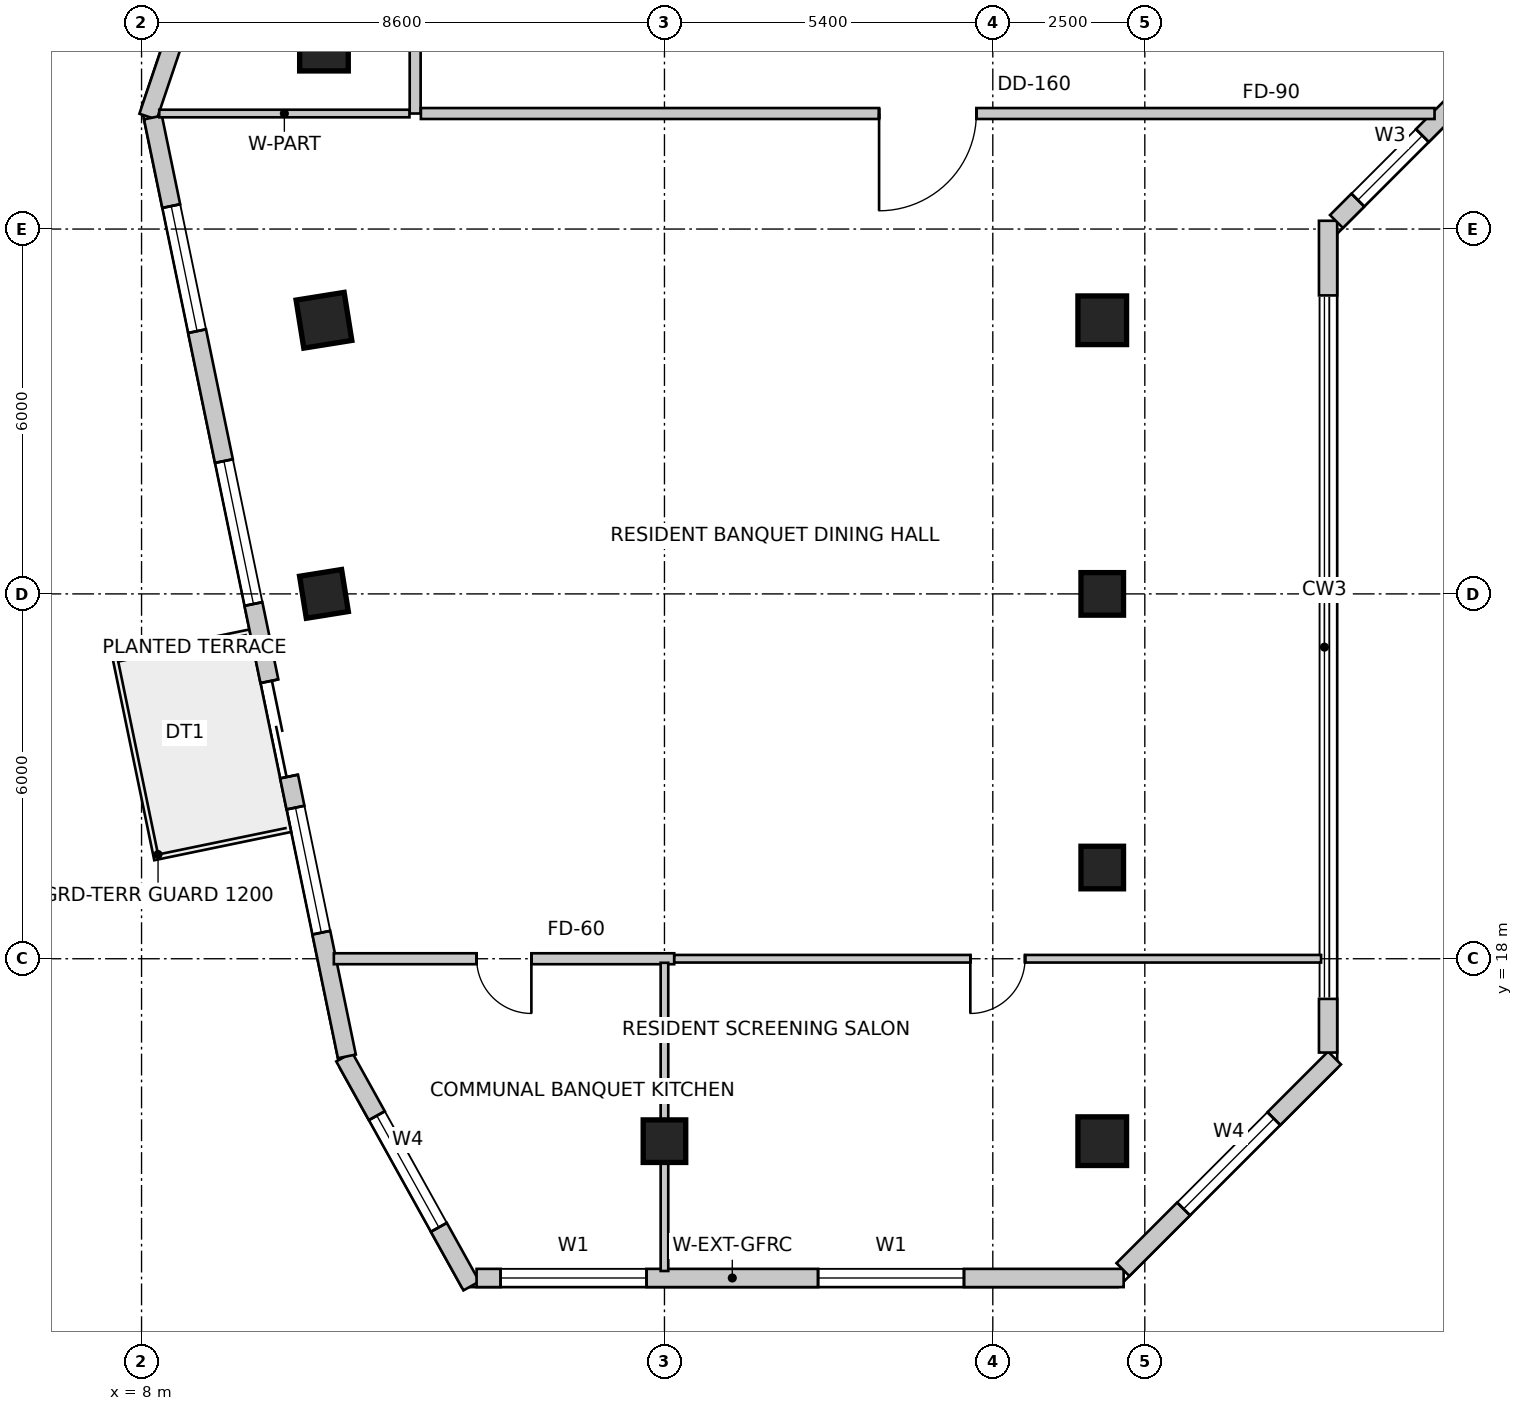
"""IFC4 building model, lengths in metres.
Left out: names, types, materials, properties, quantities, classifications, styles, units other than length and angle.
Written with IfcOpenShell. Run it as: python <this file> out.ifc"""

import sys

from ifc_helpers import new_model, si_unit, direction, frame, frame_2d, origin, origin_2d, place, context, subcontext, project, spatial, rectangle, extrude, source, transform, mapped, element, fill, save


model = new_model("IFC4")
c1 = context("Model", 3, precision=1e-05, world=origin(), true_north=direction((0.0, 1.0)))
c2 = subcontext(c1, "Body", "Model", "MODEL_VIEW")
j1 = project(units=[si_unit("LENGTHUNIT", "METRE"), si_unit("PLANEANGLEUNIT", "RADIAN")], contexts=[c1])
p1 = place(None, origin())
s1 = spatial("IfcSite", under=j1, at=p1, CompositionType="ELEMENT")
p2 = place(p1, origin())
s2 = spatial("IfcBuilding", under=s1, at=p2, CompositionType="ELEMENT")
p3 = place(p2, frame((0.0, 0.0, 207.9)))
s3 = spatial("IfcBuildingStorey", under=s2, at=p3, CompositionType="ELEMENT", Elevation=207.9)
m1 = source(origin(), c2, "Body", "SweptSolid", [
    extrude(rectangle(XDim=0.8, YDim=0.8, at=origin_2d()), origin(), (0.0, 0.0, 1.0), 3.5),
])
for number, where, z_axis, x_axis in (
    (1, (11.0, 33.0, 0.0), (0.0, 0.0, 1.0), (1.0, 0.0, 0.0)),
    (2, (11.0, 28.5, 0.0), (0.0, 0.0, 1.0), (0.158, -0.987, 0.0)),
):
    element("IfcColumn", number, at=place(p3, frame(where, z_axis=z_axis, x_axis=x_axis)), inside=s3, PredefinedType="COLUMN", context=c2, shape_type="MappedRepresentation", body=[
        mapped(m1, transform((0.0, 0.0, 0.0), scale=1.0)),
    ])
m2 = source(origin(), c2, "Body", "SweptSolid", [
    extrude(rectangle(XDim=0.7, YDim=0.7, at=origin_2d()), origin(), (0.0, 0.0, 1.0), 3.5),
])
p4 = place(p3, frame((11.0, 24.0, 0.0), z_axis=(0.0, 0.0, 1.0), x_axis=(0.158158067254, -0.987413806751, 0.0)))
e3 = element("IfcColumn", 3, at=p4, inside=s3, PredefinedType="COLUMN", context=c2, shape_type="MappedRepresentation", body=[
    mapped(m2, transform((0.0, 0.0, 0.0), scale=1.0)),
])
p5 = place(p3, frame((23.8, 28.5, 0.0), z_axis=(0.0, 0.0, 1.0), x_axis=(1.0, 0.0, 0.0)))
e4 = element("IfcColumn", 4, at=p5, inside=s3, PredefinedType="COLUMN", context=c2, shape_type="MappedRepresentation", body=[
    mapped(m1, transform((0.0, 0.0, 0.0), scale=1.0)),
])
for number, where, z_axis, x_axis in (
    (5, (23.8, 24.0, 0.0), (0.0, 0.0, 1.0), (1.0, 0.0, 0.0)),
    (6, (23.8, 19.5, 0.0), (0.0, 0.0, 1.0), (1.0, 0.0, 0.0)),
):
    element("IfcColumn", number, at=place(p3, frame(where, z_axis=z_axis, x_axis=x_axis)), inside=s3, PredefinedType="COLUMN", context=c2, shape_type="MappedRepresentation", body=[
        mapped(m2, transform((0.0, 0.0, 0.0), scale=1.0)),
    ])
p6 = place(p3, frame((23.8, 15.0, 0.0), z_axis=(0.0, 0.0, 1.0), x_axis=(1.0, 0.0, 0.0)))
e7 = element("IfcColumn", 7, at=p6, inside=s3, PredefinedType="COLUMN", context=c2, shape_type="MappedRepresentation", body=[
    mapped(m1, transform((0.0, 0.0, 0.0), scale=1.0)),
])
p7 = place(p3, frame((16.6, 15.0, 0.0), z_axis=(0.0, 0.0, 1.0), x_axis=(1.0, 0.0, 0.0)))
e8 = element("IfcColumn", 8, at=p7, inside=s3, PredefinedType="COLUMN", context=c2, shape_type="MappedRepresentation", body=[
    mapped(m2, transform((0.0, 0.0, 0.0), scale=1.0)),
])
p8 = place(p3, frame((11.333, 16.384, 0.0), z_axis=(0.0, 0.0, 1.0), x_axis=(0.485633305139, -0.874162623852, 0.0)))
e9 = element("IfcWall", 9, at=p8, inside=s3, PredefinedType="SOLIDWALL", context=c2, shape_type="SweptSolid", body=[
    extrude(rectangle(XDim=4.307, YDim=0.3, at=frame_2d((2.153, 0.0))), origin(), (0.0, 0.0, 1.0), 3.2),
])
m3 = source(origin(), c2, "Body", "SweptSolid", [
    extrude(rectangle(XDim=2.1, YDim=2.0, at=frame_2d((1.05, 1.0))), frame((0.0, 0.16, 0.0), z_axis=(0.0, -1.0, 0.0), x_axis=(1.0, 0.0, 0.0)), (0.0, 0.0, 1.0), 0.32),
])
p9 = place(p8, frame((1.104, 0.0, 0.85)))
e10 = element("IfcOpeningElement", 10, at=p9, cuts=e9, PredefinedType="OPENING", context=c2, shape_type="MappedRepresentation", body=[
    mapped(m3, transform((0.0, 0.0, 0.0), scale=1.0)),
])
p10 = place(p3, frame((13.51, 12.75, 0.0), z_axis=(0.0, 0.0, 1.0), x_axis=(1.0, 0.0, 0.0)))
e11 = element("IfcWall", 11, at=p10, inside=s3, PredefinedType="SOLIDWALL", context=c2, shape_type="SweptSolid", body=[
    extrude(rectangle(XDim=10.642, YDim=0.3, at=frame_2d((5.321, 0.0))), origin(), (0.0, 0.0, 1.0), 3.2),
])
m4 = source(origin(), c2, "Body", "SweptSolid", [
    extrude(rectangle(XDim=2.4, YDim=2.2, at=frame_2d((1.2, 1.1))), frame((0.0, 0.16, 0.0), z_axis=(0.0, -1.0, 0.0), x_axis=(1.0, 0.0, 0.0)), (0.0, 0.0, 1.0), 0.32),
])
p11 = place(p10, frame((0.395, 0.0, 0.85)))
e12 = element("IfcOpeningElement", 12, at=p11, cuts=e11, PredefinedType="OPENING", context=c2, shape_type="MappedRepresentation", body=[
    mapped(m4, transform((0.0, 0.0, 0.0), scale=1.0)),
])
p12 = place(p10, frame((5.616, 0.0, 0.85)))
e13 = element("IfcOpeningElement", 13, at=p12, cuts=e11, PredefinedType="OPENING", context=c2, shape_type="MappedRepresentation", body=[
    mapped(m4, transform((0.0, 0.0, 0.0), scale=1.0)),
])
p13 = place(p3, frame((24.14, 12.888, 0.0), z_axis=(0.0, 0.0, 1.0), x_axis=(0.707106781187, 0.707106781187, 0.0)))
e14 = element("IfcWall", 14, at=p13, inside=s3, PredefinedType="SOLIDWALL", context=c2, shape_type="SweptSolid", body=[
    extrude(rectangle(XDim=4.922, YDim=0.3, at=frame_2d((2.461, 0.0))), origin(), (0.0, 0.0, 1.0), 3.2),
])
p14 = place(p13, frame((1.411, 0.0, 0.85)))
e15 = element("IfcOpeningElement", 15, at=p14, cuts=e14, PredefinedType="OPENING", context=c2, shape_type="MappedRepresentation", body=[
    mapped(m3, transform((0.0, 0.0, 0.0), scale=1.0)),
])
p15 = place(p3, frame((27.514, 16.457, 0.0), z_axis=(0.0, 0.0, 1.0), x_axis=(0.0, 1.0, 0.0)))
e16 = element("IfcWall", 16, at=p15, inside=s3, PredefinedType="SOLIDWALL", context=c2, shape_type="SweptSolid", body=[
    extrude(rectangle(XDim=0.882, YDim=0.3, at=frame_2d((0.441, 0.0))), origin(), (0.0, 0.0, 1.0), 3.2),
])
p16 = place(p3, frame((27.514, 28.909, 0.0), z_axis=(0.0, 0.0, 1.0), x_axis=(0.0, 1.0, 0.0)))
e17 = element("IfcWall", 17, at=p16, inside=s3, PredefinedType="SOLIDWALL", context=c2, shape_type="SweptSolid", body=[
    extrude(rectangle(XDim=1.227, YDim=0.3, at=frame_2d((0.614, 0.0))), origin(), (0.0, 0.0, 1.0), 3.2),
])
p17 = place(p3, frame((27.652, 30.124, 0.0), z_axis=(0.0, 0.0, 1.0), x_axis=(0.707064797706, 0.707148762175, 0.0)))
e18 = element("IfcWall", 18, at=p17, inside=s3, PredefinedType="SOLIDWALL", context=c2, shape_type="SweptSolid", body=[
    extrude(rectangle(XDim=2.908, YDim=0.3, at=frame_2d((1.454, 0.0))), origin(), (0.0, 0.0, 1.0), 3.2),
])
m5 = source(origin(), c2, "Body", "SweptSolid", [
    extrude(rectangle(XDim=1.5, YDim=1.8, at=frame_2d((0.75, 0.9))), frame((0.0, 0.16, 0.0), z_axis=(0.0, -1.0, 0.0), x_axis=(1.0, 0.0, 0.0)), (0.0, 0.0, 1.0), 0.32),
])
p18 = place(p17, frame((0.498, 0.0, 0.85)))
e19 = element("IfcOpeningElement", 19, at=p18, cuts=e18, PredefinedType="OPENING", context=c2, shape_type="MappedRepresentation", body=[
    mapped(m5, transform((0.0, 0.0, 0.0), scale=1.0)),
])
p19 = place(p3, frame((13.269, 47.134, 0.0), z_axis=(0.0, 0.0, 1.0), x_axis=(-0.319920776449, -0.947444297464, 0.0)))
e20 = element("IfcWall", 20, at=p19, inside=s3, PredefinedType="SOLIDWALL", context=c2, shape_type="SweptSolid", body=[
    extrude(rectangle(XDim=16.133, YDim=0.3, at=frame_2d((8.067, 0.0))), origin(), (0.0, 0.0, 1.0), 3.2),
])
p20 = place(p19, frame((2.363, 0.0, 0.85)))
e21 = element("IfcOpeningElement", 21, at=p20, cuts=e20, PredefinedType="OPENING", context=c2, shape_type="MappedRepresentation", body=[
    mapped(m4, transform((0.0, 0.0, 0.0), scale=1.0)),
])
p21 = place(p19, frame((7.41, 0.0, 0.85)))
e22 = element("IfcOpeningElement", 22, at=p21, cuts=e20, PredefinedType="OPENING", context=c2, shape_type="MappedRepresentation", body=[
    mapped(m3, transform((0.0, 0.0, 0.0), scale=1.0)),
])
p22 = place(p19, frame((12.157, 0.0, 0.85)))
e23 = element("IfcOpeningElement", 23, at=p22, cuts=e20, PredefinedType="OPENING", context=c2, shape_type="MappedRepresentation", body=[
    mapped(m4, transform((0.0, 0.0, 0.0), scale=1.0)),
])
p23 = place(p3, frame((8.188, 31.834, 0.0), z_axis=(0.0, 0.0, 1.0), x_axis=(0.202303475707, -0.979322880217, 0.0)))
e24 = element("IfcWall", 24, at=p23, inside=s3, PredefinedType="SOLIDWALL", context=c2, shape_type="SweptSolid", body=[
    extrude(rectangle(XDim=15.766, YDim=0.3, at=frame_2d((7.883, 0.0))), origin(), (0.0, 0.0, 1.0), 3.2),
])
m6 = source(origin(), c2, "Body", "SweptSolid", [
    extrude(rectangle(XDim=1.6, YDim=2.15, at=frame_2d((0.8, 1.075))), frame((0.0, 0.16, 0.0), z_axis=(0.0, -1.0, 0.0), x_axis=(1.0, 0.0, 0.0)), (0.0, 0.0, 1.0), 0.32),
])
p24 = place(p23, frame((9.466, 0.0, 0.0)))
e25 = element("IfcOpeningElement", 25, at=p24, cuts=e24, PredefinedType="OPENING", context=c2, shape_type="MappedRepresentation", body=[
    mapped(m6, transform((0.0, 0.0, 0.0), scale=1.0)),
])
p25 = place(p23, frame((1.487, 0.0, 0.85)))
e26 = element("IfcOpeningElement", 26, at=p25, cuts=e24, PredefinedType="OPENING", context=c2, shape_type="MappedRepresentation", body=[
    mapped(m3, transform((0.0, 0.0, 0.0), scale=1.0)),
])
p26 = place(p23, frame((5.769, 0.0, 0.85)))
e27 = element("IfcOpeningElement", 27, at=p26, cuts=e24, PredefinedType="OPENING", context=c2, shape_type="MappedRepresentation", body=[
    mapped(m4, transform((0.0, 0.0, 0.0), scale=1.0)),
])
p27 = place(p23, frame((11.588, 0.0, 0.85)))
e28 = element("IfcOpeningElement", 28, at=p27, cuts=e24, PredefinedType="OPENING", context=c2, shape_type="MappedRepresentation", body=[
    mapped(m3, transform((0.0, 0.0, 0.0), scale=1.0)),
])
p28 = place(p3, frame((12.5, 31.9, 0.0), z_axis=(0.0, 0.0, 1.0), x_axis=(0.0, 1.0, 0.0)))
e29 = element("IfcWall", 29, at=p28, inside=s3, PredefinedType="PARTITIONING", context=c2, shape_type="SweptSolid", body=[
    extrude(rectangle(XDim=1.556, YDim=0.18, at=frame_2d((0.778, 0.0))), origin(), (0.0, 0.0, 1.0), 2.869),
])
p29 = place(p3, frame((29.265, 31.9, 0.0), z_axis=(0.0, 0.0, 1.0), x_axis=(-1.0, 0.0, 0.0)))
e30 = element("IfcWall", 30, at=p29, inside=s3, PredefinedType="PARTITIONING", context=c2, shape_type="SweptSolid", body=[
    extrude(rectangle(XDim=16.671, YDim=0.18, at=frame_2d((8.335, 0.0))), origin(), (0.0, 0.0, 1.0), 2.869),
])
m7 = source(origin(), c2, "Body", "SweptSolid", [
    extrude(rectangle(XDim=1.6, YDim=2.15, at=frame_2d((0.8, 1.075))), frame((0.0, 0.1, 0.0), z_axis=(0.0, -1.0, 0.0), x_axis=(1.0, 0.0, 0.0)), (0.0, 0.0, 1.0), 0.2),
])
p30 = place(p29, frame((7.536, 0.0, 0.0)))
e31 = element("IfcOpeningElement", 31, at=p30, cuts=e30, PredefinedType="OPENING", context=c2, shape_type="MappedRepresentation", body=[
    mapped(m7, transform((0.0, 0.0, 0.0), scale=1.0)),
])
p31 = place(p3, frame((12.406, 31.9, 0.0), z_axis=(0.0, 0.0, 1.0), x_axis=(-1.0, 0.0, 0.0)))
e32 = element("IfcWall", 32, at=p31, inside=s3, PredefinedType="PARTITIONING", context=c2, shape_type="SweptSolid", body=[
    extrude(rectangle(XDim=4.115, YDim=0.125, at=frame_2d((2.057, 0.0))), origin(), (0.0, 0.0, 1.0), 2.492),
])
p32 = place(p3, frame((16.76, 18.0, 0.0), z_axis=(0.0, 0.0, 1.0), x_axis=(-1.0, 0.0, 0.0)))
e33 = element("IfcWall", 33, at=p32, inside=s3, PredefinedType="PARTITIONING", context=c2, shape_type="SweptSolid", body=[
    extrude(rectangle(XDim=5.597, YDim=0.18, at=frame_2d((2.799, 0.0))), origin(), (0.0, 0.0, 1.0), 3.2),
])
m8 = source(origin(), c2, "Body", "SweptSolid", [
    extrude(rectangle(XDim=0.9, YDim=2.15, at=frame_2d((0.45, 1.075))), frame((0.0, 0.1, 0.0), z_axis=(0.0, -1.0, 0.0), x_axis=(1.0, 0.0, 0.0)), (0.0, 0.0, 1.0), 0.2),
])
p33 = place(p32, frame((2.349, 0.0, 0.0)))
e34 = element("IfcOpeningElement", 34, at=p33, cuts=e33, PredefinedType="OPENING", context=c2, shape_type="MappedRepresentation", body=[
    mapped(m8, transform((0.0, 0.0, 0.0), scale=1.0)),
])
p34 = place(p3, frame((27.399, 18.0, 0.0), z_axis=(0.0, 0.0, 1.0), x_axis=(-1.0, 0.0, 0.0)))
e35 = element("IfcWall", 35, at=p34, inside=s3, PredefinedType="PARTITIONING", context=c2, shape_type="SweptSolid", body=[
    extrude(rectangle(XDim=10.637, YDim=0.125, at=frame_2d((5.318, 0.0))), origin(), (0.0, 0.0, 1.0), 2.492),
])
m9 = source(origin(), c2, "Body", "SweptSolid", [
    extrude(rectangle(XDim=0.9, YDim=2.15, at=frame_2d((0.45, 1.075))), frame((0.0, 0.073, 0.0), z_axis=(0.0, -1.0, 0.0), x_axis=(1.0, 0.0, 0.0)), (0.0, 0.0, 1.0), 0.145),
])
p35 = place(p34, frame((4.868, 0.0, 0.0)))
e36 = element("IfcOpeningElement", 36, at=p35, cuts=e35, PredefinedType="OPENING", context=c2, shape_type="MappedRepresentation", body=[
    mapped(m9, transform((0.0, 0.0, 0.0), scale=1.0)),
])
p36 = place(p3, frame((16.6, 17.934, 0.0), z_axis=(0.0, 0.0, 1.0), x_axis=(0.0, -1.0, 0.0)))
e37 = element("IfcWall", 37, at=p36, inside=s3, PredefinedType="PARTITIONING", context=c2, shape_type="SweptSolid", body=[
    extrude(rectangle(XDim=5.069, YDim=0.125, at=frame_2d((2.534, 0.0))), origin(), (0.0, 0.0, 1.0), 2.492),
])
m10 = source(origin(), c2, "Body", "SweptSolid", [
    extrude(rectangle(XDim=2.1, YDim=2.0, at=frame_2d((1.05, 1.0))), frame((0.0, -0.015, 0.0), z_axis=(0.0, -1.0, 0.0), x_axis=(1.0, 0.0, 0.0)), (0.0, 0.0, 1.0), 0.06),
])
p37 = place(p9, origin())
e38 = element("IfcWindow", 38, at=p37, inside=s3, PartitioningType="SINGLE_PANEL", PredefinedType="WINDOW", context=c2, shape_type="MappedRepresentation", body=[
    mapped(m10, transform((0.0, 0.0, 0.0), scale=1.0)),
])
fill(e10, e38)
m11 = source(origin(), c2, "Body", "SweptSolid", [
    extrude(rectangle(XDim=2.4, YDim=2.2, at=frame_2d((1.2, 1.1))), frame((0.0, -0.015, 0.0), z_axis=(0.0, -1.0, 0.0), x_axis=(1.0, 0.0, 0.0)), (0.0, 0.0, 1.0), 0.06),
])
p38 = place(p11, origin())
e39 = element("IfcWindow", 39, at=p38, inside=s3, PartitioningType="SINGLE_PANEL", PredefinedType="WINDOW", context=c2, shape_type="MappedRepresentation", body=[
    mapped(m11, transform((0.0, 0.0, 0.0), scale=1.0)),
])
fill(e12, e39)
p39 = place(p12, origin())
e40 = element("IfcWindow", 40, at=p39, inside=s3, PartitioningType="SINGLE_PANEL", PredefinedType="WINDOW", context=c2, shape_type="MappedRepresentation", body=[
    mapped(m11, transform((0.0, 0.0, 0.0), scale=1.0)),
])
fill(e13, e40)
p40 = place(p14, origin())
e41 = element("IfcWindow", 41, at=p40, inside=s3, PartitioningType="SINGLE_PANEL", PredefinedType="WINDOW", context=c2, shape_type="MappedRepresentation", body=[
    mapped(m10, transform((0.0, 0.0, 0.0), scale=1.0)),
])
fill(e15, e41)
m12 = source(origin(), c2, "Body", "SweptSolid", [
    extrude(rectangle(XDim=1.5, YDim=1.8, at=frame_2d((0.75, 0.9))), frame((0.0, -0.015, 0.0), z_axis=(0.0, -1.0, 0.0), x_axis=(1.0, 0.0, 0.0)), (0.0, 0.0, 1.0), 0.06),
])
p41 = place(p18, origin())
e42 = element("IfcWindow", 42, at=p41, inside=s3, PartitioningType="SINGLE_PANEL", PredefinedType="WINDOW", context=c2, shape_type="MappedRepresentation", body=[
    mapped(m12, transform((0.0, 0.0, 0.0), scale=1.0)),
])
fill(e19, e42)
m13 = source(origin(), c2, "Body", "SweptSolid", [
    extrude(rectangle(XDim=1.6, YDim=2.15, at=frame_2d((0.8, 1.075))), frame((0.0, 0.025, 0.0), z_axis=(0.0, -1.0, 0.0), x_axis=(1.0, 0.0, 0.0)), (0.0, 0.0, 1.0), 0.05),
])
p42 = place(p24, origin())
e43 = element("IfcDoor", 43, at=p42, inside=s3, OperationType="DOUBLE_DOOR_SLIDING", PredefinedType="DOOR", context=c2, shape_type="MappedRepresentation", body=[
    mapped(m13, transform((0.0, 0.0, 0.0), scale=1.0)),
])
fill(e25, e43)
p43 = place(p25, origin())
e44 = element("IfcWindow", 44, at=p43, inside=s3, PartitioningType="SINGLE_PANEL", PredefinedType="WINDOW", context=c2, shape_type="MappedRepresentation", body=[
    mapped(m10, transform((0.0, 0.0, 0.0), scale=1.0)),
])
fill(e26, e44)
p44 = place(p26, origin())
e45 = element("IfcWindow", 45, at=p44, inside=s3, PartitioningType="SINGLE_PANEL", PredefinedType="WINDOW", context=c2, shape_type="MappedRepresentation", body=[
    mapped(m11, transform((0.0, 0.0, 0.0), scale=1.0)),
])
fill(e27, e45)
p45 = place(p27, origin())
e46 = element("IfcWindow", 46, at=p45, inside=s3, PartitioningType="SINGLE_PANEL", PredefinedType="WINDOW", context=c2, shape_type="MappedRepresentation", body=[
    mapped(m10, transform((0.0, 0.0, 0.0), scale=1.0)),
])
fill(e28, e46)
m14 = source(origin(), c2, "Body", "SweptSolid", [
    extrude(rectangle(XDim=1.6, YDim=2.15, at=frame_2d((0.8, 1.075))), frame((0.0, 0.025, 0.0), z_axis=(0.0, -1.0, 0.0), x_axis=(1.0, 0.0, 0.0)), (0.0, 0.0, 1.0), 0.05),
])
p46 = place(p30, origin())
e47 = element("IfcDoor", 47, at=p46, inside=s3, OperationType="SINGLE_SWING_RIGHT", PredefinedType="DOOR", context=c2, shape_type="MappedRepresentation", body=[
    mapped(m14, transform((0.0, 0.0, 0.0), scale=1.0)),
])
fill(e31, e47)
m15 = source(origin(), c2, "Body", "SweptSolid", [
    extrude(rectangle(XDim=0.9, YDim=2.15, at=frame_2d((0.45, 1.075))), frame((0.0, 0.025, 0.0), z_axis=(0.0, -1.0, 0.0), x_axis=(1.0, 0.0, 0.0)), (0.0, 0.0, 1.0), 0.05),
])
p47 = place(p33, origin())
e48 = element("IfcDoor", 48, at=p47, inside=s3, OperationType="SINGLE_SWING_LEFT", PredefinedType="DOOR", context=c2, shape_type="MappedRepresentation", body=[
    mapped(m15, transform((0.0, 0.0, 0.0), scale=1.0)),
])
fill(e34, e48)
m16 = source(origin(), c2, "Body", "SweptSolid", [
    extrude(rectangle(XDim=0.9, YDim=2.15, at=frame_2d((0.45, 1.075))), frame((0.0, 0.025, 0.0), z_axis=(0.0, -1.0, 0.0), x_axis=(1.0, 0.0, 0.0)), (0.0, 0.0, 1.0), 0.05),
])
p48 = place(p35, origin())
e49 = element("IfcDoor", 49, at=p48, inside=s3, OperationType="SINGLE_SWING_RIGHT", PredefinedType="DOOR", context=c2, shape_type="MappedRepresentation", body=[
    mapped(m16, transform((0.0, 0.0, 0.0), scale=1.0)),
])
fill(e36, e49)
save(model, sys.argv[1])
